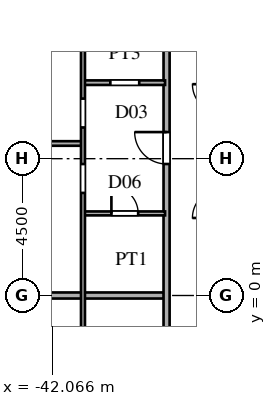
"""IFC4 building model, lengths in metres.
Left out: names, types, materials, properties, quantities, classifications, styles, units other than length and angle.
Written with IfcOpenShell. Run it as: python <this file> out.ifc"""

import sys

from ifc_helpers import new_model, si_unit, direction, frame, frame_2d, origin, place, context, subcontext, project, spatial, rectangle, extrude, source, transform, mapped, element, fill, save


model = new_model("IFC4")
c1 = context("Model", 3, precision=1e-05, world=origin(), true_north=direction((0.0, 1.0)))
c2 = subcontext(c1, "Body", "Model", "MODEL_VIEW")
j1 = project(units=[si_unit("LENGTHUNIT", "METRE"), si_unit("PLANEANGLEUNIT", "RADIAN")], contexts=[c1])
p1 = place(None, origin())
s1 = spatial("IfcSite", under=j1, at=p1, CompositionType="ELEMENT")
p2 = place(p1, origin())
s2 = spatial("IfcBuilding", under=s1, at=p2, CompositionType="ELEMENT")
p3 = place(p2, frame((0.0, 0.0, 147.6)))
s3 = spatial("IfcBuildingStorey", under=s2, at=p3, CompositionType="ELEMENT", Elevation=147.6)
p4 = place(p3, frame((-69.505, 0.0, 0.0), z_axis=(0.0, 0.0, 1.0), x_axis=(1.0, 0.0, 0.0)))
e1 = element("IfcWall", 1, at=p4, inside=s3, PredefinedType="PARTITIONING", context=c2, shape_type="SweptSolid", body=[
    extrude(rectangle(XDim=31.125, YDim=0.2, at=frame_2d((15.562, 0.0))), origin(), (0.0, 0.0, 1.0), 3.38),
])
p5 = place(p3, frame((-41.0, 2.7, 0.0), z_axis=(0.0, 0.0, 1.0), x_axis=(1.0, 0.0, 0.0)))
e2 = element("IfcWall", 2, at=p5, inside=s3, PredefinedType="PARTITIONING", context=c2, shape_type="SweptSolid", body=[
    extrude(rectangle(XDim=2.65, YDim=0.13, at=frame_2d((1.325, 0.0))), origin(), (0.0, 0.0, 1.0), 3.38),
])
p6 = place(p5, frame((0.885, 0.0, 0.0)))
e3 = element("IfcOpeningElement", 3, at=p6, cuts=e2, PredefinedType="OPENING", context=c2, shape_type="SweptSolid", body=[
    extrude(rectangle(XDim=0.88, YDim=2.1, at=frame_2d((0.44, 1.05))), frame((0.0, 0.075, 0.0), z_axis=(0.0, -1.0, 0.0), x_axis=(1.0, 0.0, 0.0)), (0.0, 0.0, 1.0), 0.15),
])
p7 = place(p3, frame((-69.226, 5.0, 0.0), z_axis=(0.0, 0.0, 1.0), x_axis=(1.0, 0.0, 0.0)))
e4 = element("IfcWall", 4, at=p7, inside=s3, PredefinedType="PARTITIONING", context=c2, shape_type="SweptSolid", body=[
    extrude(rectangle(XDim=28.126, YDim=0.15, at=frame_2d((14.063, 0.0))), origin(), (0.0, 0.0, 1.0), 3.38),
])
p8 = place(p7, frame((11.401, 0.0, 0.0)))
e5 = element("IfcOpeningElement", 5, at=p8, cuts=e4, PredefinedType="OPENING", context=c2, shape_type="SweptSolid", body=[
    extrude(rectangle(XDim=0.95, YDim=2.15, at=frame_2d((0.475, 1.075))), frame((0.0, 0.085, 0.0), z_axis=(0.0, -1.0, 0.0), x_axis=(1.0, 0.0, 0.0)), (0.0, 0.0, 1.0), 0.17),
])
p9 = place(p7, frame((17.614, 0.0, 0.0)))
e6 = element("IfcOpeningElement", 6, at=p9, cuts=e4, PredefinedType="OPENING", context=c2, shape_type="SweptSolid", body=[
    extrude(rectangle(XDim=0.95, YDim=2.15, at=frame_2d((0.475, 1.075))), frame((0.0, 0.085, 0.0), z_axis=(0.0, -1.0, 0.0), x_axis=(1.0, 0.0, 0.0)), (0.0, 0.0, 1.0), 0.17),
])
p10 = place(p3, frame((-41.0, 7.0, 0.0), z_axis=(0.0, 0.0, 1.0), x_axis=(1.0, 0.0, 0.0)))
e7 = element("IfcWall", 7, at=p10, inside=s3, PredefinedType="PARTITIONING", context=c2, shape_type="SweptSolid", body=[
    extrude(rectangle(XDim=2.65, YDim=0.15, at=frame_2d((1.325, 0.0))), origin(), (0.0, 0.0, 1.0), 3.38),
])
p11 = place(p10, frame((0.85, 0.0, 0.0)))
e8 = element("IfcOpeningElement", 8, at=p11, cuts=e7, PredefinedType="OPENING", context=c2, shape_type="SweptSolid", body=[
    extrude(rectangle(XDim=0.95, YDim=2.15, at=frame_2d((0.475, 1.075))), frame((0.0, 0.085, 0.0), z_axis=(0.0, -1.0, 0.0), x_axis=(1.0, 0.0, 0.0)), (0.0, 0.0, 1.0), 0.17),
])
p12 = place(p3, frame((-41.05, -3.398, 0.0), z_axis=(0.0, 0.0, 1.0), x_axis=(0.0, 1.0, 0.0)))
e9 = element("IfcWall", 9, at=p12, inside=s3, PredefinedType="PARTITIONING", context=c2, shape_type="SweptSolid", body=[
    extrude(rectangle(XDim=23.032, YDim=0.13, at=frame_2d((11.516, 0.0))), origin(), (0.0, 0.0, 1.0), 2.99),
])
p13 = place(p12, frame((6.772, 0.0, 0.0)))
e10 = element("IfcOpeningElement", 10, at=p13, cuts=e9, PredefinedType="OPENING", context=c2, shape_type="SweptSolid", body=[
    extrude(rectangle(XDim=0.95, YDim=2.15, at=frame_2d((0.475, 1.075))), frame((0.0, 0.075, 0.0), z_axis=(0.0, -1.0, 0.0), x_axis=(1.0, 0.0, 0.0)), (0.0, 0.0, 1.0), 0.15),
])
p14 = place(p12, frame((8.924, 0.0, 0.0)))
e11 = element("IfcOpeningElement", 11, at=p14, cuts=e9, PredefinedType="OPENING", context=c2, shape_type="SweptSolid", body=[
    extrude(rectangle(XDim=0.95, YDim=2.15, at=frame_2d((0.475, 1.075))), frame((0.0, 0.075, 0.0), z_axis=(0.0, -1.0, 0.0), x_axis=(1.0, 0.0, 0.0)), (0.0, 0.0, 1.0), 0.15),
])
p15 = place(p12, frame((14.321, 0.0, 0.0)))
e12 = element("IfcOpeningElement", 12, at=p15, cuts=e9, PredefinedType="OPENING", context=c2, shape_type="SweptSolid", body=[
    extrude(rectangle(XDim=0.95, YDim=2.15, at=frame_2d((0.475, 1.075))), frame((0.0, 0.075, 0.0), z_axis=(0.0, -1.0, 0.0), x_axis=(1.0, 0.0, 0.0)), (0.0, 0.0, 1.0), 0.15),
])
p16 = place(p12, frame((21.273, 0.0, 0.0)))
e13 = element("IfcOpeningElement", 13, at=p16, cuts=e9, PredefinedType="OPENING", context=c2, shape_type="SweptSolid", body=[
    extrude(rectangle(XDim=0.95, YDim=2.15, at=frame_2d((0.475, 1.075))), frame((0.0, 0.075, 0.0), z_axis=(0.0, -1.0, 0.0), x_axis=(1.0, 0.0, 0.0)), (0.0, 0.0, 1.0), 0.15),
])
p17 = place(p3, frame((-38.3, -15.715, 0.0), z_axis=(0.0, 0.0, 1.0), x_axis=(0.0, 1.0, 0.0)))
e14 = element("IfcWall", 14, at=p17, inside=s3, PredefinedType="PARTITIONING", context=c2, shape_type="SweptSolid", body=[
    extrude(rectangle(XDim=31.43, YDim=0.2, at=frame_2d((15.715, 0.0))), origin(), (0.0, 0.0, 1.0), 3.38),
])
p18 = place(p17, frame((2.39, 0.0, 0.0)))
e15 = element("IfcOpeningElement", 15, at=p18, cuts=e14, PredefinedType="OPENING", context=c2, shape_type="SweptSolid", body=[
    extrude(rectangle(XDim=1.05, YDim=2.25, at=frame_2d((0.525, 1.125))), frame((0.0, 0.11, 0.0), z_axis=(0.0, -1.0, 0.0), x_axis=(1.0, 0.0, 0.0)), (0.0, 0.0, 1.0), 0.22),
])
p19 = place(p17, frame((9.268, 0.0, 0.0)))
e16 = element("IfcOpeningElement", 16, at=p19, cuts=e14, PredefinedType="OPENING", context=c2, shape_type="SweptSolid", body=[
    extrude(rectangle(XDim=1.05, YDim=2.25, at=frame_2d((0.525, 1.125))), frame((0.0, 0.11, 0.0), z_axis=(0.0, -1.0, 0.0), x_axis=(1.0, 0.0, 0.0)), (0.0, 0.0, 1.0), 0.22),
])
p20 = place(p17, frame((20.04, 0.0, 0.0)))
e17 = element("IfcOpeningElement", 17, at=p20, cuts=e14, PredefinedType="OPENING", context=c2, shape_type="SweptSolid", body=[
    extrude(rectangle(XDim=1.05, YDim=2.25, at=frame_2d((0.525, 1.125))), frame((0.0, 0.11, 0.0), z_axis=(0.0, -1.0, 0.0), x_axis=(1.0, 0.0, 0.0)), (0.0, 0.0, 1.0), 0.22),
])
p21 = place(p17, frame((26.587, 0.0, 0.0)))
e18 = element("IfcOpeningElement", 18, at=p21, cuts=e14, PredefinedType="OPENING", context=c2, shape_type="SweptSolid", body=[
    extrude(rectangle(XDim=1.05, YDim=2.25, at=frame_2d((0.525, 1.125))), frame((0.0, 0.11, 0.0), z_axis=(0.0, -1.0, 0.0), x_axis=(1.0, 0.0, 0.0)), (0.0, 0.0, 1.0), 0.22),
])
m1 = source(origin(), c2, "Body", "SweptSolid", [
    extrude(rectangle(XDim=0.88, YDim=2.1, at=frame_2d((0.44, 1.05))), frame((0.0, 0.025, 0.0), z_axis=(0.0, -1.0, 0.0), x_axis=(1.0, 0.0, 0.0)), (0.0, 0.0, 1.0), 0.05),
])
p22 = place(p6, origin())
e19 = element("IfcDoor", 19, at=p22, inside=s3, OperationType="SINGLE_SWING_LEFT", PredefinedType="DOOR", context=c2, shape_type="MappedRepresentation", body=[
    mapped(m1, transform((0.0, 0.0, 0.0), scale=1.0)),
])
fill(e3, e19)
m2 = source(origin(), c2, "Body", "SweptSolid", [
    extrude(rectangle(XDim=1.05, YDim=2.25, at=frame_2d((0.525, 1.125))), frame((0.0, 0.025, 0.0), z_axis=(0.0, -1.0, 0.0), x_axis=(1.0, 0.0, 0.0)), (0.0, 0.0, 1.0), 0.05),
])
p23 = place(p20, origin())
e20 = element("IfcDoor", 20, at=p23, inside=s3, OperationType="SINGLE_SWING_RIGHT", PredefinedType="DOOR", context=c2, shape_type="MappedRepresentation", body=[
    mapped(m2, transform((0.0, 0.0, 0.0), scale=1.0)),
])
fill(e17, e20)
save(model, sys.argv[1])
